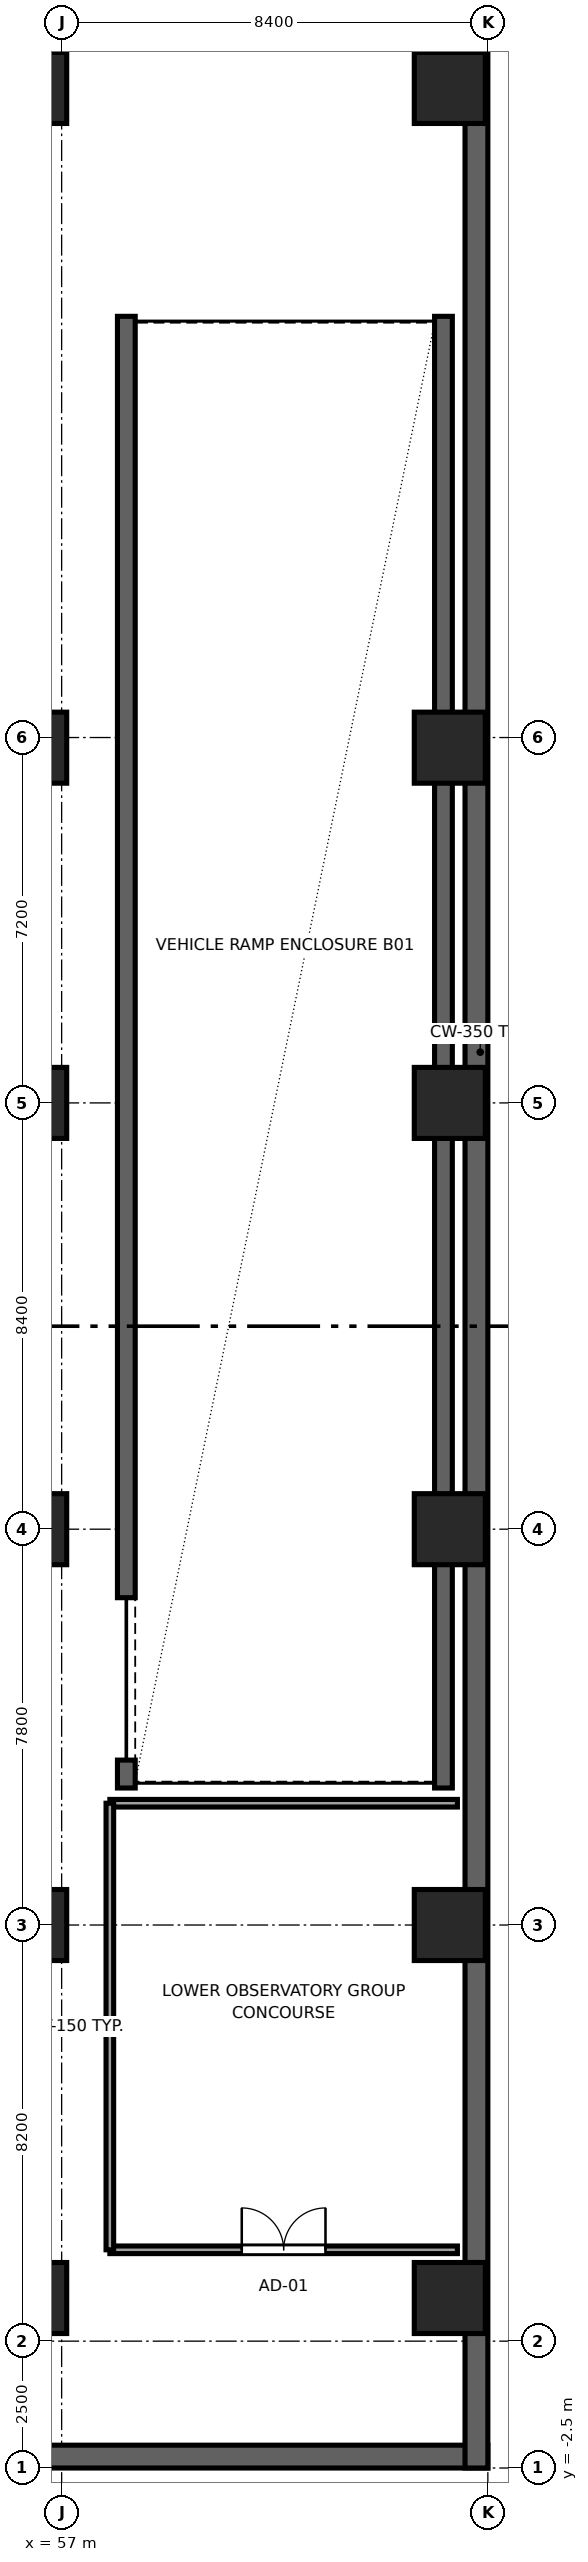
"""IFC4 building model, lengths in metres.
Left out: names, types, materials, properties, quantities, classifications, styles, units other than length and angle.
Written with IfcOpenShell. Run it as: python <this file> out.ifc"""

import sys

from ifc_helpers import new_model, si_unit, direction, frame, frame_2d, origin, origin_2d, place, context, subcontext, project, spatial, rectangle, extrude, source, transform, mapped, element, fill, save


model = new_model("IFC4")
c1 = context("Model", 3, precision=1e-05, world=origin(), true_north=direction((0.0, 1.0)))
c2 = subcontext(c1, "Body", "Model", "MODEL_VIEW")
j1 = project(units=[si_unit("LENGTHUNIT", "METRE"), si_unit("PLANEANGLEUNIT", "RADIAN")], contexts=[c1])
p1 = place(None, origin())
s1 = spatial("IfcSite", under=j1, at=p1, CompositionType="ELEMENT")
p2 = place(p1, origin())
s2 = spatial("IfcBuilding", under=s1, at=p2, CompositionType="ELEMENT")
p3 = place(p2, frame((0.0, 0.0, -4.8)))
s3 = spatial("IfcBuildingStorey", under=s2, at=p3, CompositionType="ELEMENT", Elevation=-4.8)
p4 = place(p3, frame((58.275, 10.9, 0.0), z_axis=(0.0, 0.0, 1.0), x_axis=(0.0, 1.0, 0.0)))
e1 = element("IfcWall", 1, at=p4, inside=s3, PredefinedType="SHEAR", context=c2, shape_type="SweptSolid", body=[
    extrude(rectangle(XDim=0.55, YDim=0.35, at=frame_2d((0.275, 0.0))), origin(), (0.0, 0.0, 1.0), 4.8),
])
p5 = place(p3, frame((58.275, 14.65, 0.0), z_axis=(0.0, 0.0, 1.0), x_axis=(0.0, 1.0, 0.0)))
e2 = element("IfcWall", 2, at=p5, inside=s3, PredefinedType="SHEAR", context=c2, shape_type="SweptSolid", body=[
    extrude(rectangle(XDim=25.25, YDim=0.35, at=frame_2d((12.625, 0.0))), origin(), (0.0, 0.0, 1.0), 4.8),
])
p6 = place(p3, frame((64.525, 10.9, 0.0), z_axis=(0.0, 0.0, 1.0), x_axis=(0.0, 1.0, 0.0)))
e3 = element("IfcWall", 3, at=p6, inside=s3, PredefinedType="SHEAR", context=c2, shape_type="SweptSolid", body=[
    extrude(rectangle(XDim=29.0, YDim=0.35, at=frame_2d((14.5, 0.0))), origin(), (0.0, 0.0, 1.0), 4.8),
])
p7 = place(p3, frame((-8.4, -2.275, 0.0), z_axis=(0.0, 0.0, 1.0), x_axis=(1.0, 0.0, 0.0)))
e4 = element("IfcWall", 4, at=p7, inside=s3, PredefinedType="SOLIDWALL", context=c2, shape_type="SweptSolid", body=[
    extrude(rectangle(XDim=73.8, YDim=0.45, at=frame_2d((36.9, 0.0))), origin(), (0.0, 0.0, 1.0), 4.8),
])
p8 = place(p3, frame((65.175, -2.5, 0.0), z_axis=(0.0, 0.0, 1.0), x_axis=(0.0, 1.0, 0.0)))
e5 = element("IfcWall", 5, at=p8, inside=s3, PredefinedType="SOLIDWALL", context=c2, shape_type="SweptSolid", body=[
    extrude(rectangle(XDim=51.0, YDim=0.45, at=frame_2d((25.5, 0.0))), origin(), (0.0, 0.0, 1.0), 4.8),
])
m1 = source(origin(), c2, "Body", "SweptSolid", [
    extrude(rectangle(XDim=1.4, YDim=1.4, at=origin_2d()), origin(), (0.0, 0.0, 1.0), 4.8),
])
for number, where, z_axis, x_axis in (
    (6, (64.65, 0.85, 0.0), (0.0, 0.0, 1.0), (1.0, 0.0, 0.0)),
    (7, (64.65, 8.2, 0.0), (0.0, 0.0, 1.0), (1.0, 0.0, 0.0)),
    (8, (64.65, 16.0, 0.0), (0.0, 0.0, 1.0), (1.0, 0.0, 0.0)),
    (9, (64.65, 24.4, 0.0), (0.0, 0.0, 1.0), (1.0, 0.0, 0.0)),
    (10, (64.65, 31.4, 0.0), (0.0, 0.0, 1.0), (1.0, 0.0, 0.0)),
    (11, (64.65, 44.4, 0.0), (0.0, 0.0, 1.0), (1.0, 0.0, 0.0)),
    (12, (56.4, 0.85, 0.0), (0.0, 0.0, 1.0), (1.0, 0.0, 0.0)),
    (13, (56.4, 8.2, 0.0), (0.0, 0.0, 1.0), (1.0, 0.0, 0.0)),
    (14, (56.4, 16.0, 0.0), (0.0, 0.0, 1.0), (1.0, 0.0, 0.0)),
    (15, (56.4, 24.4, 0.0), (0.0, 0.0, 1.0), (1.0, 0.0, 0.0)),
    (16, (56.4, 31.4, 0.0), (0.0, 0.0, 1.0), (1.0, 0.0, 0.0)),
    (17, (56.4, 44.4, 0.0), (0.0, 0.0, 1.0), (1.0, 0.0, 0.0)),
):
    element("IfcColumn", number, at=place(p3, frame(where, z_axis=z_axis, x_axis=x_axis)), inside=s3, PredefinedType="COLUMN", context=c2, shape_type="MappedRepresentation", body=[
        mapped(m1, transform((0.0, 0.0, 0.0), x_axis=(1.0, 0.0, 0.0), y_axis=(0.0, 1.0, 0.0), z_axis=(0.0, 0.0, 1.0), scale=1.0)),
    ])
p9 = place(p3, frame((57.95, 1.8, 0.0), z_axis=(0.0, 0.0, 1.0), x_axis=(1.0, 0.0, 0.0)))
e18 = element("IfcWall", 18, at=p9, inside=s3, PredefinedType="PARTITIONING", context=c2, shape_type="SweptSolid", body=[
    extrude(rectangle(XDim=6.85, YDim=0.15, at=frame_2d((3.425, 0.0))), origin(), (0.0, 0.0, 1.0), 4.54),
])
p10 = place(p9, frame((2.6, 0.0, 0.0)))
e19 = element("IfcOpeningElement", 19, at=p10, cuts=e18, PredefinedType="OPENING", context=c2, shape_type="SweptSolid", body=[
    extrude(rectangle(XDim=1.65, YDim=2.15, at=frame_2d((0.825, 1.075))), frame((0.0, 0.085, 0.0), z_axis=(0.0, -1.0, 0.0), x_axis=(1.0, 0.0, 0.0)), (0.0, 0.0, 1.0), 0.17),
])
p11 = place(p3, frame((57.95, 10.6, 0.0), z_axis=(0.0, 0.0, 1.0), x_axis=(1.0, 0.0, 0.0)))
e20 = element("IfcWall", 20, at=p11, inside=s3, PredefinedType="PARTITIONING", context=c2, shape_type="SweptSolid", body=[
    extrude(rectangle(XDim=6.85, YDim=0.15, at=frame_2d((3.425, 0.0))), origin(), (0.0, 0.0, 1.0), 4.54),
])
p12 = place(p3, frame((57.95, 1.8, 0.0), z_axis=(0.0, 0.0, 1.0), x_axis=(0.0, 1.0, 0.0)))
e21 = element("IfcWall", 21, at=p12, inside=s3, PredefinedType="PARTITIONING", context=c2, shape_type="SweptSolid", body=[
    extrude(rectangle(XDim=8.8, YDim=0.15, at=frame_2d((4.4, 0.0))), origin(), (0.0, 0.0, 1.0), 4.54),
])
m2 = source(origin(), c2, "Body", "SweptSolid", [
    extrude(rectangle(XDim=1.65, YDim=2.15, at=frame_2d((0.825, 1.075))), frame((0.0, 0.025, 0.0), z_axis=(0.0, -1.0, 0.0), x_axis=(1.0, 0.0, 0.0)), (0.0, 0.0, 1.0), 0.05),
])
p13 = place(p10, origin())
e22 = element("IfcDoor", 22, at=p13, inside=s3, OperationType="DOUBLE_DOOR_SINGLE_SWING", PredefinedType="DOOR", context=c2, shape_type="MappedRepresentation", body=[
    mapped(m2, transform((0.0, 0.0, 0.0), x_axis=(1.0, 0.0, 0.0), y_axis=(0.0, 1.0, 0.0), z_axis=(0.0, 0.0, 1.0), scale=1.0)),
])
fill(e19, e22)
save(model, sys.argv[1])
